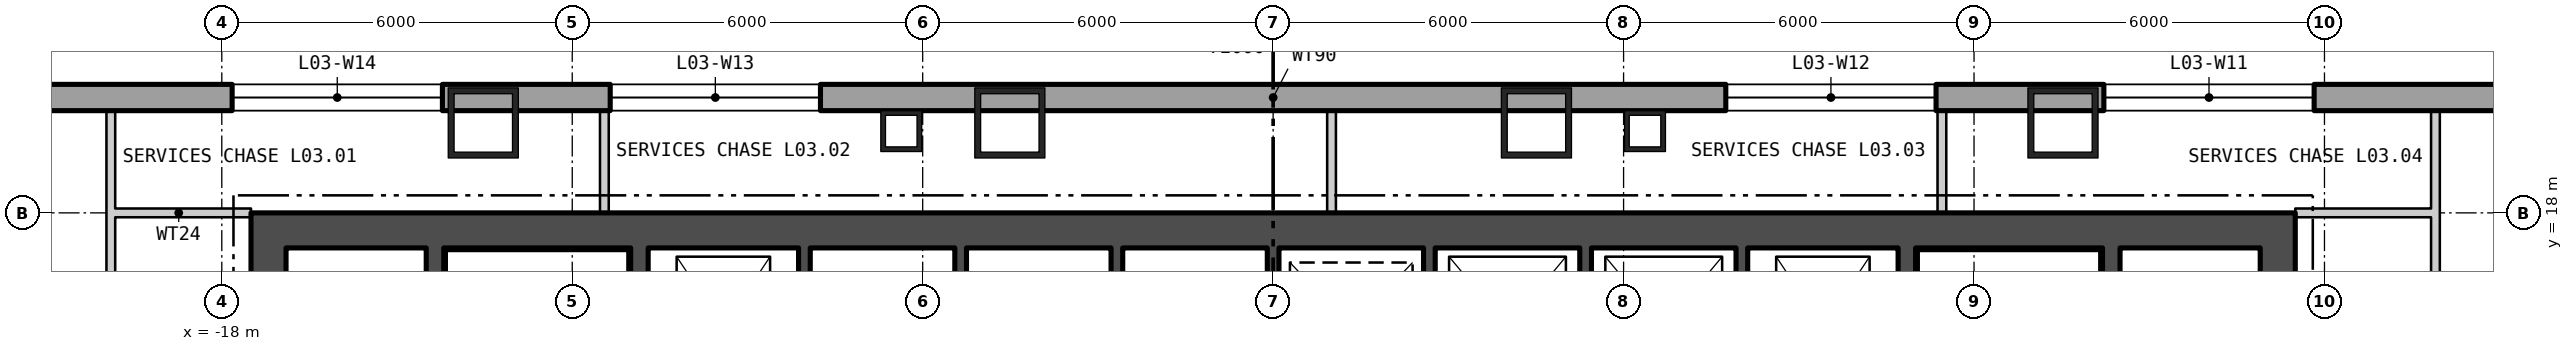
"""IFC4 building model, lengths in metres.
Left out: names, types, materials, properties, quantities, classifications, styles, units other than length and angle.
Written with IfcOpenShell. Run it as: python <this file> out.ifc"""

import sys

from ifc_helpers import new_model, si_unit, direction, frame, frame_2d, origin, origin_2d, place, context, subcontext, project, spatial, polyline, rectangle, hollow_rectangle, outline, extrude, element, fill, save


model = new_model("IFC4")
c1 = context("Model", 3, precision=1e-05, world=origin(), true_north=direction((0.0, 1.0)))
c2 = subcontext(c1, "Body", "Model", "MODEL_VIEW")
j1 = project(units=[si_unit("LENGTHUNIT", "METRE"), si_unit("PLANEANGLEUNIT", "RADIAN")], contexts=[c1])
p1 = place(None, origin())
s1 = spatial("IfcSite", under=j1, at=p1, CompositionType="ELEMENT")
p2 = place(p1, origin())
s2 = spatial("IfcBuilding", under=s1, at=p2, CompositionType="ELEMENT")
p3 = place(p2, frame((0.0, 0.0, 18.6)))
s3 = spatial("IfcBuildingStorey", under=s2, at=p3, CompositionType="ELEMENT", Elevation=18.6)
for number, where, z_axis, x_axis in (
    (1, (13.523, 19.54, 0.0), (0.0, 0.0, 1.0), (-1.0, 0.0, 0.0)),
    (2, (4.508, 19.54, 0.0), (0.0, 0.0, 1.0), (-1.0, 0.0, 0.0)),
    (3, (-4.508, 19.54, 0.0), (0.0, 0.0, 1.0), (-1.0, 0.0, 0.0)),
    (4, (-13.523, 19.54, 0.0), (0.0, 0.0, 1.0), (-1.0, 0.0, 0.0)),
):
    element("IfcColumn", number, at=place(p3, frame(where, z_axis=z_axis, x_axis=x_axis)), inside=s3, PredefinedType="COLUMN", context=c2, shape_type="SweptSolid", body=[
        extrude(hollow_rectangle(XDim=1.2, YDim=1.2, WallThickness=0.1, at=origin_2d()), origin(), (0.0, 0.0, 1.0), 5.1),
    ])
for number, where, z_axis, x_axis in (
    (5, (6.367, 19.4, 0.0), (0.0, 0.0, 1.0), (-1.0, 0.0, 0.0)),
    (6, (-6.367, 19.4, 0.0), (0.0, 0.0, 1.0), (-1.0, 0.0, 0.0)),
):
    element("IfcColumn", number, at=place(p3, frame(where, z_axis=z_axis, x_axis=x_axis)), inside=s3, PredefinedType="COLUMN", context=c2, shape_type="SweptSolid", body=[
        extrude(hollow_rectangle(XDim=0.7, YDim=0.7, WallThickness=0.08, at=origin_2d()), origin(), (0.0, 0.0, 1.0), 5.1),
    ])
p4 = place(p3, frame((38.775, 19.975, -0.4), z_axis=(0.0, 0.0, 1.0), x_axis=(-1.0, 0.0, 0.0)))
e7 = element("IfcWall", 7, at=p4, inside=s3, PredefinedType="SOLIDWALL", context=c2, shape_type="SweptSolid", body=[
    extrude(outline(polyline([(-0.225, -0.225), (77.775, -0.225), (77.325, 0.225), (0.225, 0.225), (-0.225, -0.225)])), origin(), (0.0, 0.0, 1.0), 5.1),
])
p5 = place(p4, frame((1.958, 0.0, 1.3)))
e8 = element("IfcOpeningElement", 8, at=p5, cuts=e7, PredefinedType="OPENING", context=c2, shape_type="SweptSolid", body=[
    extrude(rectangle(XDim=3.6, YDim=3.2, at=frame_2d((1.8, 1.6))), frame((0.0, 0.235, 0.0), z_axis=(0.0, -1.0, 0.0), x_axis=(1.0, 0.0, 0.0)), (0.0, 0.0, 1.0), 0.47),
])
p6 = place(p4, frame((8.325, 0.0, 1.3)))
e9 = element("IfcOpeningElement", 9, at=p6, cuts=e7, PredefinedType="OPENING", context=c2, shape_type="SweptSolid", body=[
    extrude(rectangle(XDim=3.6, YDim=3.2, at=frame_2d((1.8, 1.6))), frame((0.0, 0.235, 0.0), z_axis=(0.0, -1.0, 0.0), x_axis=(1.0, 0.0, 0.0)), (0.0, 0.0, 1.0), 0.47),
])
p7 = place(p4, frame((20.952, 0.0, 1.3)))
e10 = element("IfcOpeningElement", 10, at=p7, cuts=e7, PredefinedType="OPENING", context=c2, shape_type="SweptSolid", body=[
    extrude(rectangle(XDim=3.6, YDim=3.2, at=frame_2d((1.8, 1.6))), frame((0.0, 0.235, 0.0), z_axis=(0.0, -1.0, 0.0), x_axis=(1.0, 0.0, 0.0)), (0.0, 0.0, 1.0), 0.47),
])
p8 = place(p4, frame((27.425, 0.0, 1.3)))
e11 = element("IfcOpeningElement", 11, at=p8, cuts=e7, PredefinedType="OPENING", context=c2, shape_type="SweptSolid", body=[
    extrude(rectangle(XDim=3.6, YDim=3.2, at=frame_2d((1.8, 1.6))), frame((0.0, 0.235, 0.0), z_axis=(0.0, -1.0, 0.0), x_axis=(1.0, 0.0, 0.0)), (0.0, 0.0, 1.0), 0.47),
])
p9 = place(p4, frame((46.525, 0.0, 1.3)))
e12 = element("IfcOpeningElement", 12, at=p9, cuts=e7, PredefinedType="OPENING", context=c2, shape_type="SweptSolid", body=[
    extrude(rectangle(XDim=3.6, YDim=3.2, at=frame_2d((1.8, 1.6))), frame((0.0, 0.235, 0.0), z_axis=(0.0, -1.0, 0.0), x_axis=(1.0, 0.0, 0.0)), (0.0, 0.0, 1.0), 0.47),
])
p10 = place(p4, frame((52.998, 0.0, 1.3)))
e13 = element("IfcOpeningElement", 13, at=p10, cuts=e7, PredefinedType="OPENING", context=c2, shape_type="SweptSolid", body=[
    extrude(rectangle(XDim=3.6, YDim=3.2, at=frame_2d((1.8, 1.6))), frame((0.0, 0.235, 0.0), z_axis=(0.0, -1.0, 0.0), x_axis=(1.0, 0.0, 0.0)), (0.0, 0.0, 1.0), 0.47),
])
p11 = place(p4, frame((65.625, 0.0, 1.3)))
e14 = element("IfcOpeningElement", 14, at=p11, cuts=e7, PredefinedType="OPENING", context=c2, shape_type="SweptSolid", body=[
    extrude(rectangle(XDim=3.6, YDim=3.2, at=frame_2d((1.8, 1.6))), frame((0.0, 0.235, 0.0), z_axis=(0.0, -1.0, 0.0), x_axis=(1.0, 0.0, 0.0)), (0.0, 0.0, 1.0), 0.47),
])
p12 = place(p4, frame((71.992, 0.0, 1.3)))
e15 = element("IfcOpeningElement", 15, at=p12, cuts=e7, PredefinedType="OPENING", context=c2, shape_type="SweptSolid", body=[
    extrude(rectangle(XDim=3.6, YDim=3.2, at=frame_2d((1.8, 1.6))), frame((0.0, 0.235, 0.0), z_axis=(0.0, -1.0, 0.0), x_axis=(1.0, 0.0, 0.0)), (0.0, 0.0, 1.0), 0.47),
])
p13 = place(p3, frame((-17.5, 17.7, 0.0), z_axis=(0.0, 0.0, 1.0), x_axis=(1.0, 0.0, 0.0)))
e16 = element("IfcWall", 16, at=p13, inside=s3, PredefinedType="SHEAR", context=c2, shape_type="SweptSolid", body=[
    extrude(rectangle(XDim=35.0, YDim=0.6, at=frame_2d((17.5, 0.0))), origin(), (0.0, 0.0, 1.0), 4.88),
])
p14 = place(p3, frame((-17.2, 0.6, 0.0), z_axis=(0.0, 0.0, 1.0), x_axis=(0.0, 1.0, 0.0)))
e17 = element("IfcWall", 17, at=p14, inside=s3, PredefinedType="SHEAR", context=c2, shape_type="SweptSolid", body=[
    extrude(rectangle(XDim=16.8, YDim=0.6, at=frame_2d((8.4, 0.0))), origin(), (0.0, 0.0, 1.0), 4.88),
])
p15 = place(p14, frame((5.7, 0.0, 0.0)))
e18 = element("IfcOpeningElement", 18, at=p15, cuts=e17, PredefinedType="OPENING", context=c2, shape_type="SweptSolid", body=[
    extrude(rectangle(XDim=1.5, YDim=2.1, at=frame_2d((0.75, 1.05))), frame((0.0, 0.31, 0.0), z_axis=(0.0, -1.0, 0.0), x_axis=(1.0, 0.0, 0.0)), (0.0, 0.0, 1.0), 0.62),
])
p16 = place(p14, frame((0.875, 0.0, 0.0)))
e19 = element("IfcOpeningElement", 19, at=p16, cuts=e17, PredefinedType="OPENING", context=c2, shape_type="SweptSolid", body=[
    extrude(rectangle(XDim=0.9, YDim=2.1, at=frame_2d((0.45, 1.05))), frame((0.0, 0.31, 0.0), z_axis=(0.0, -1.0, 0.0), x_axis=(1.0, 0.0, 0.0)), (0.0, 0.0, 1.0), 0.62),
])
p17 = place(p14, frame((3.724, 0.0, 0.0)))
e20 = element("IfcOpeningElement", 20, at=p17, cuts=e17, PredefinedType="OPENING", context=c2, shape_type="SweptSolid", body=[
    extrude(rectangle(XDim=0.9, YDim=2.1, at=frame_2d((0.45, 1.05))), frame((0.0, 0.31, 0.0), z_axis=(0.0, -1.0, 0.0), x_axis=(1.0, 0.0, 0.0)), (0.0, 0.0, 1.0), 0.62),
])
p18 = place(p14, frame((8.115, 0.0, 0.0)))
e21 = element("IfcOpeningElement", 21, at=p18, cuts=e17, PredefinedType="OPENING", context=c2, shape_type="SweptSolid", body=[
    extrude(rectangle(XDim=1.0, YDim=2.1, at=frame_2d((0.5, 1.05))), frame((0.0, 0.31, 0.0), z_axis=(0.0, -1.0, 0.0), x_axis=(1.0, 0.0, 0.0)), (0.0, 0.0, 1.0), 0.62),
])
p19 = place(p14, frame((11.528, 0.0, 0.0)))
e22 = element("IfcOpeningElement", 22, at=p19, cuts=e17, PredefinedType="OPENING", context=c2, shape_type="SweptSolid", body=[
    extrude(rectangle(XDim=0.9, YDim=2.1, at=frame_2d((0.45, 1.05))), frame((0.0, 0.31, 0.0), z_axis=(0.0, -1.0, 0.0), x_axis=(1.0, 0.0, 0.0)), (0.0, 0.0, 1.0), 0.62),
])
p20 = place(p14, frame((14.987, 0.0, 0.0)))
e23 = element("IfcOpeningElement", 23, at=p20, cuts=e17, PredefinedType="OPENING", context=c2, shape_type="SweptSolid", body=[
    extrude(rectangle(XDim=0.9, YDim=2.1, at=frame_2d((0.45, 1.05))), frame((0.0, 0.31, 0.0), z_axis=(0.0, -1.0, 0.0), x_axis=(1.0, 0.0, 0.0)), (0.0, 0.0, 1.0), 0.62),
])
p21 = place(p3, frame((17.2, 0.6, 0.0), z_axis=(0.0, 0.0, 1.0), x_axis=(0.0, 1.0, 0.0)))
e24 = element("IfcWall", 24, at=p21, inside=s3, PredefinedType="SHEAR", context=c2, shape_type="SweptSolid", body=[
    extrude(rectangle(XDim=16.8, YDim=0.6, at=frame_2d((8.4, 0.0))), origin(), (0.0, 0.0, 1.0), 4.88),
])
p22 = place(p21, frame((5.7, 0.0, 0.0)))
e25 = element("IfcOpeningElement", 25, at=p22, cuts=e24, PredefinedType="OPENING", context=c2, shape_type="SweptSolid", body=[
    extrude(rectangle(XDim=1.5, YDim=2.1, at=frame_2d((0.75, 1.05))), frame((0.0, 0.31, 0.0), z_axis=(0.0, -1.0, 0.0), x_axis=(1.0, 0.0, 0.0)), (0.0, 0.0, 1.0), 0.62),
])
p23 = place(p21, frame((0.4, 0.0, 0.0)))
e26 = element("IfcOpeningElement", 26, at=p23, cuts=e24, PredefinedType="OPENING", context=c2, shape_type="SweptSolid", body=[
    extrude(rectangle(XDim=0.9, YDim=2.1, at=frame_2d((0.45, 1.05))), frame((0.0, 0.31, 0.0), z_axis=(0.0, -1.0, 0.0), x_axis=(1.0, 0.0, 0.0)), (0.0, 0.0, 1.0), 0.62),
])
p24 = place(p21, frame((3.15, 0.0, 0.0)))
e27 = element("IfcOpeningElement", 27, at=p24, cuts=e24, PredefinedType="OPENING", context=c2, shape_type="SweptSolid", body=[
    extrude(rectangle(XDim=0.9, YDim=2.1, at=frame_2d((0.45, 1.05))), frame((0.0, 0.31, 0.0), z_axis=(0.0, -1.0, 0.0), x_axis=(1.0, 0.0, 0.0)), (0.0, 0.0, 1.0), 0.62),
])
p25 = place(p21, frame((8.082, 0.0, 0.0)))
e28 = element("IfcOpeningElement", 28, at=p25, cuts=e24, PredefinedType="OPENING", context=c2, shape_type="SweptSolid", body=[
    extrude(rectangle(XDim=1.0, YDim=2.1, at=frame_2d((0.5, 1.05))), frame((0.0, 0.31, 0.0), z_axis=(0.0, -1.0, 0.0), x_axis=(1.0, 0.0, 0.0)), (0.0, 0.0, 1.0), 0.62),
])
p26 = place(p21, frame((11.801, 0.0, 0.0)))
e29 = element("IfcOpeningElement", 29, at=p26, cuts=e24, PredefinedType="OPENING", context=c2, shape_type="SweptSolid", body=[
    extrude(rectangle(XDim=0.9, YDim=2.1, at=frame_2d((0.45, 1.05))), frame((0.0, 0.31, 0.0), z_axis=(0.0, -1.0, 0.0), x_axis=(1.0, 0.0, 0.0)), (0.0, 0.0, 1.0), 0.62),
])
p27 = place(p21, frame((15.294, 0.0, 0.0)))
e30 = element("IfcOpeningElement", 30, at=p27, cuts=e24, PredefinedType="OPENING", context=c2, shape_type="SweptSolid", body=[
    extrude(rectangle(XDim=0.9, YDim=2.1, at=frame_2d((0.45, 1.05))), frame((0.0, 0.31, 0.0), z_axis=(0.0, -1.0, 0.0), x_axis=(1.0, 0.0, 0.0)), (0.0, 0.0, 1.0), 0.62),
])
p28 = place(p3, frame((-10.85, 0.6, 0.0), z_axis=(0.0, 0.0, 1.0), x_axis=(0.0, 1.0, 0.0)))
e31 = element("IfcWall", 31, at=p28, inside=s3, PredefinedType="SHEAR", context=c2, shape_type="SweptSolid", body=[
    extrude(rectangle(XDim=16.8, YDim=0.3, at=frame_2d((8.4, 0.0))), origin(), (0.0, 0.0, 1.0), 4.88),
])
p29 = place(p28, frame((5.075, 0.0, 0.0)))
e32 = element("IfcOpeningElement", 32, at=p29, cuts=e31, PredefinedType="OPENING", context=c2, shape_type="SweptSolid", body=[
    extrude(rectangle(XDim=1.25, YDim=2.1, at=frame_2d((0.625, 1.05))), frame((0.0, 0.16, 0.0), z_axis=(0.0, -1.0, 0.0), x_axis=(1.0, 0.0, 0.0)), (0.0, 0.0, 1.0), 0.32),
])
p30 = place(p28, frame((1.525, 0.0, 0.0)))
e33 = element("IfcOpeningElement", 33, at=p30, cuts=e31, PredefinedType="OPENING", context=c2, shape_type="SweptSolid", body=[
    extrude(rectangle(XDim=1.0, YDim=2.1, at=frame_2d((0.5, 1.05))), frame((0.0, 0.16, 0.0), z_axis=(0.0, -1.0, 0.0), x_axis=(1.0, 0.0, 0.0)), (0.0, 0.0, 1.0), 0.32),
])
p31 = place(p3, frame((-14.35, 0.6, 0.0), z_axis=(0.0, 0.0, 1.0), x_axis=(0.0, 1.0, 0.0)))
e34 = element("IfcWall", 34, at=p31, inside=s3, PredefinedType="SHEAR", context=c2, shape_type="SweptSolid", body=[
    extrude(rectangle(XDim=16.8, YDim=0.3, at=frame_2d((8.4, 0.0))), origin(), (0.0, 0.0, 1.0), 4.88),
])
p32 = place(p31, frame((5.7, 0.0, 0.0)))
e35 = element("IfcOpeningElement", 35, at=p32, cuts=e34, PredefinedType="OPENING", context=c2, shape_type="SweptSolid", body=[
    extrude(rectangle(XDim=1.5, YDim=2.1, at=frame_2d((0.75, 1.05))), frame((0.0, 0.16, 0.0), z_axis=(0.0, -1.0, 0.0), x_axis=(1.0, 0.0, 0.0)), (0.0, 0.0, 1.0), 0.32),
])
p33 = place(p3, frame((10.85, 0.6, 0.0), z_axis=(0.0, 0.0, 1.0), x_axis=(0.0, 1.0, 0.0)))
e36 = element("IfcWall", 36, at=p33, inside=s3, PredefinedType="SHEAR", context=c2, shape_type="SweptSolid", body=[
    extrude(rectangle(XDim=16.8, YDim=0.3, at=frame_2d((8.4, 0.0))), origin(), (0.0, 0.0, 1.0), 4.88),
])
p34 = place(p33, frame((5.075, 0.0, 0.0)))
e37 = element("IfcOpeningElement", 37, at=p34, cuts=e36, PredefinedType="OPENING", context=c2, shape_type="SweptSolid", body=[
    extrude(rectangle(XDim=1.25, YDim=2.1, at=frame_2d((0.625, 1.05))), frame((0.0, 0.16, 0.0), z_axis=(0.0, -1.0, 0.0), x_axis=(1.0, 0.0, 0.0)), (0.0, 0.0, 1.0), 0.32),
])
p35 = place(p33, frame((1.525, 0.0, 0.0)))
e38 = element("IfcOpeningElement", 38, at=p35, cuts=e36, PredefinedType="OPENING", context=c2, shape_type="SweptSolid", body=[
    extrude(rectangle(XDim=1.0, YDim=2.1, at=frame_2d((0.5, 1.05))), frame((0.0, 0.16, 0.0), z_axis=(0.0, -1.0, 0.0), x_axis=(1.0, 0.0, 0.0)), (0.0, 0.0, 1.0), 0.32),
])
p36 = place(p3, frame((14.35, 0.6, 0.0), z_axis=(0.0, 0.0, 1.0), x_axis=(0.0, 1.0, 0.0)))
e39 = element("IfcWall", 39, at=p36, inside=s3, PredefinedType="SHEAR", context=c2, shape_type="SweptSolid", body=[
    extrude(rectangle(XDim=16.8, YDim=0.3, at=frame_2d((8.4, 0.0))), origin(), (0.0, 0.0, 1.0), 4.88),
])
p37 = place(p36, frame((5.7, 0.0, 0.0)))
e40 = element("IfcOpeningElement", 40, at=p37, cuts=e39, PredefinedType="OPENING", context=c2, shape_type="SweptSolid", body=[
    extrude(rectangle(XDim=1.5, YDim=2.1, at=frame_2d((0.75, 1.05))), frame((0.0, 0.16, 0.0), z_axis=(0.0, -1.0, 0.0), x_axis=(1.0, 0.0, 0.0)), (0.0, 0.0, 1.0), 0.32),
])
for number, where, z_axis, x_axis in (
    (41, (-8.025, 14.7, 0.0), (0.0, 0.0, 1.0), (0.0, 1.0, 0.0)),
    (42, (-5.35, 14.7, 0.0), (0.0, 0.0, 1.0), (0.0, 1.0, 0.0)),
    (43, (-2.675, 14.7, 0.0), (0.0, 0.0, 1.0), (0.0, 1.0, 0.0)),
    (44, (0.0, 14.7, 0.0), (0.0, 0.0, 1.0), (0.0, 1.0, 0.0)),
    (45, (2.675, 14.7, 0.0), (0.0, 0.0, 1.0), (0.0, 1.0, 0.0)),
    (46, (5.35, 14.7, 0.0), (0.0, 0.0, 1.0), (0.0, 1.0, 0.0)),
    (47, (8.025, 14.7, 0.0), (0.0, 0.0, 1.0), (0.0, 1.0, 0.0)),
):
    element("IfcWall", number, at=place(p3, frame(where, z_axis=z_axis, x_axis=x_axis)), inside=s3, PredefinedType="SHEAR", context=c2, shape_type="SweptSolid", body=[
        extrude(rectangle(XDim=2.7, YDim=0.2, at=frame_2d((1.35, 0.0))), origin(), (0.0, 0.0, 1.0), 4.88),
    ])
p38 = place(p3, frame((-19.975, 18.0, 0.0), z_axis=(0.0, 0.0, 1.0), x_axis=(1.0, 0.0, 0.0)))
e48 = element("IfcWall", 48, at=p38, inside=s3, PredefinedType="PARTITIONING", context=c2, shape_type="SweptSolid", body=[
    extrude(rectangle(XDim=2.475, YDim=0.15, at=frame_2d((1.238, 0.0))), origin(), (0.0, 0.0, 1.0), 4.33),
])
p39 = place(p3, frame((-19.9, 1.025, 0.0), z_axis=(0.0, 0.0, 1.0), x_axis=(0.0, 1.0, 0.0)))
e49 = element("IfcWall", 49, at=p39, inside=s3, PredefinedType="PARTITIONING", context=c2, shape_type="SweptSolid", body=[
    extrude(rectangle(XDim=16.9, YDim=0.15, at=frame_2d((8.45, 0.0))), origin(), (0.0, 0.0, 1.0), 4.88),
])
p40 = place(p39, frame((8.244, 0.0, 0.0)))
e50 = element("IfcOpeningElement", 50, at=p40, cuts=e49, PredefinedType="OPENING", context=c2, shape_type="SweptSolid", body=[
    extrude(rectangle(XDim=1.8, YDim=2.1, at=frame_2d((0.9, 1.05))), frame((0.0, 0.085, 0.0), z_axis=(0.0, -1.0, 0.0), x_axis=(1.0, 0.0, 0.0)), (0.0, 0.0, 1.0), 0.17),
])
p41 = place(p3, frame((-19.9, 18.075, 0.0), z_axis=(0.0, 0.0, 1.0), x_axis=(0.0, 1.0, 0.0)))
e51 = element("IfcWall", 51, at=p41, inside=s3, PredefinedType="PARTITIONING", context=c2, shape_type="SweptSolid", body=[
    extrude(rectangle(XDim=1.675, YDim=0.15, at=frame_2d((0.838, 0.0))), origin(), (0.0, 0.0, 1.0), 4.88),
])
for number, where, z_axis, x_axis in (
    (52, (-11.45, 18.0, 0.0), (0.0, 0.0, 1.0), (0.0, 1.0, 0.0)),
    (53, (1.0, 18.0, 0.0), (0.0, 0.0, 1.0), (0.0, 1.0, 0.0)),
    (54, (11.45, 18.0, 0.0), (0.0, 0.0, 1.0), (0.0, 1.0, 0.0)),
):
    element("IfcWall", number, at=place(p3, frame(where, z_axis=z_axis, x_axis=x_axis)), inside=s3, PredefinedType="PARTITIONING", context=c2, shape_type="SweptSolid", body=[
        extrude(rectangle(XDim=1.75, YDim=0.15, at=frame_2d((0.875, 0.0))), origin(), (0.0, 0.0, 1.0), 4.88),
    ])
p42 = place(p3, frame((17.5, 18.0, 0.0), z_axis=(0.0, 0.0, 1.0), x_axis=(1.0, 0.0, 0.0)))
e55 = element("IfcWall", 55, at=p42, inside=s3, PredefinedType="PARTITIONING", context=c2, shape_type="SweptSolid", body=[
    extrude(rectangle(XDim=2.475, YDim=0.15, at=frame_2d((1.238, 0.0))), origin(), (0.0, 0.0, 1.0), 4.33),
])
p43 = place(p3, frame((19.9, 1.025, 0.0), z_axis=(0.0, 0.0, 1.0), x_axis=(0.0, 1.0, 0.0)))
e56 = element("IfcWall", 56, at=p43, inside=s3, PredefinedType="PARTITIONING", context=c2, shape_type="SweptSolid", body=[
    extrude(rectangle(XDim=16.9, YDim=0.15, at=frame_2d((8.45, 0.0))), origin(), (0.0, 0.0, 1.0), 4.88),
])
p44 = place(p43, frame((7.687, 0.0, 0.0)))
e57 = element("IfcOpeningElement", 57, at=p44, cuts=e56, PredefinedType="OPENING", context=c2, shape_type="SweptSolid", body=[
    extrude(rectangle(XDim=1.0, YDim=2.1, at=frame_2d((0.5, 1.05))), frame((0.0, 0.085, 0.0), z_axis=(0.0, -1.0, 0.0), x_axis=(1.0, 0.0, 0.0)), (0.0, 0.0, 1.0), 0.17),
])
p45 = place(p3, frame((19.9, 18.075, 0.0), z_axis=(0.0, 0.0, 1.0), x_axis=(0.0, 1.0, 0.0)))
e58 = element("IfcWall", 58, at=p45, inside=s3, PredefinedType="PARTITIONING", context=c2, shape_type="SweptSolid", body=[
    extrude(rectangle(XDim=1.675, YDim=0.15, at=frame_2d((0.838, 0.0))), origin(), (0.0, 0.0, 1.0), 4.88),
])
p46 = place(p7, origin())
e59 = element("IfcWindow", 59, at=p46, inside=s3, PartitioningType="SINGLE_PANEL", PredefinedType="WINDOW", context=c2, shape_type="SweptSolid", body=[
    extrude(rectangle(XDim=3.6, YDim=3.2, at=frame_2d((1.8, 1.6))), frame((0.0, 0.105, 0.0), z_axis=(0.0, -1.0, 0.0), x_axis=(1.0, 0.0, 0.0)), (0.0, 0.0, 1.0), 0.06),
])
fill(e10, e59)
p47 = place(p8, origin())
e60 = element("IfcWindow", 60, at=p47, inside=s3, PartitioningType="SINGLE_PANEL", PredefinedType="WINDOW", context=c2, shape_type="SweptSolid", body=[
    extrude(rectangle(XDim=3.6, YDim=3.2, at=frame_2d((1.8, 1.6))), frame((0.0, 0.105, 0.0), z_axis=(0.0, -1.0, 0.0), x_axis=(1.0, 0.0, 0.0)), (0.0, 0.0, 1.0), 0.06),
])
fill(e11, e60)
p48 = place(p9, origin())
e61 = element("IfcWindow", 61, at=p48, inside=s3, PartitioningType="SINGLE_PANEL", PredefinedType="WINDOW", context=c2, shape_type="SweptSolid", body=[
    extrude(rectangle(XDim=3.6, YDim=3.2, at=frame_2d((1.8, 1.6))), frame((0.0, 0.105, 0.0), z_axis=(0.0, -1.0, 0.0), x_axis=(1.0, 0.0, 0.0)), (0.0, 0.0, 1.0), 0.06),
])
fill(e12, e61)
p49 = place(p10, origin())
e62 = element("IfcWindow", 62, at=p49, inside=s3, PartitioningType="SINGLE_PANEL", PredefinedType="WINDOW", context=c2, shape_type="SweptSolid", body=[
    extrude(rectangle(XDim=3.6, YDim=3.2, at=frame_2d((1.8, 1.6))), frame((0.0, 0.105, 0.0), z_axis=(0.0, -1.0, 0.0), x_axis=(1.0, 0.0, 0.0)), (0.0, 0.0, 1.0), 0.06),
])
fill(e13, e62)
save(model, sys.argv[1])
